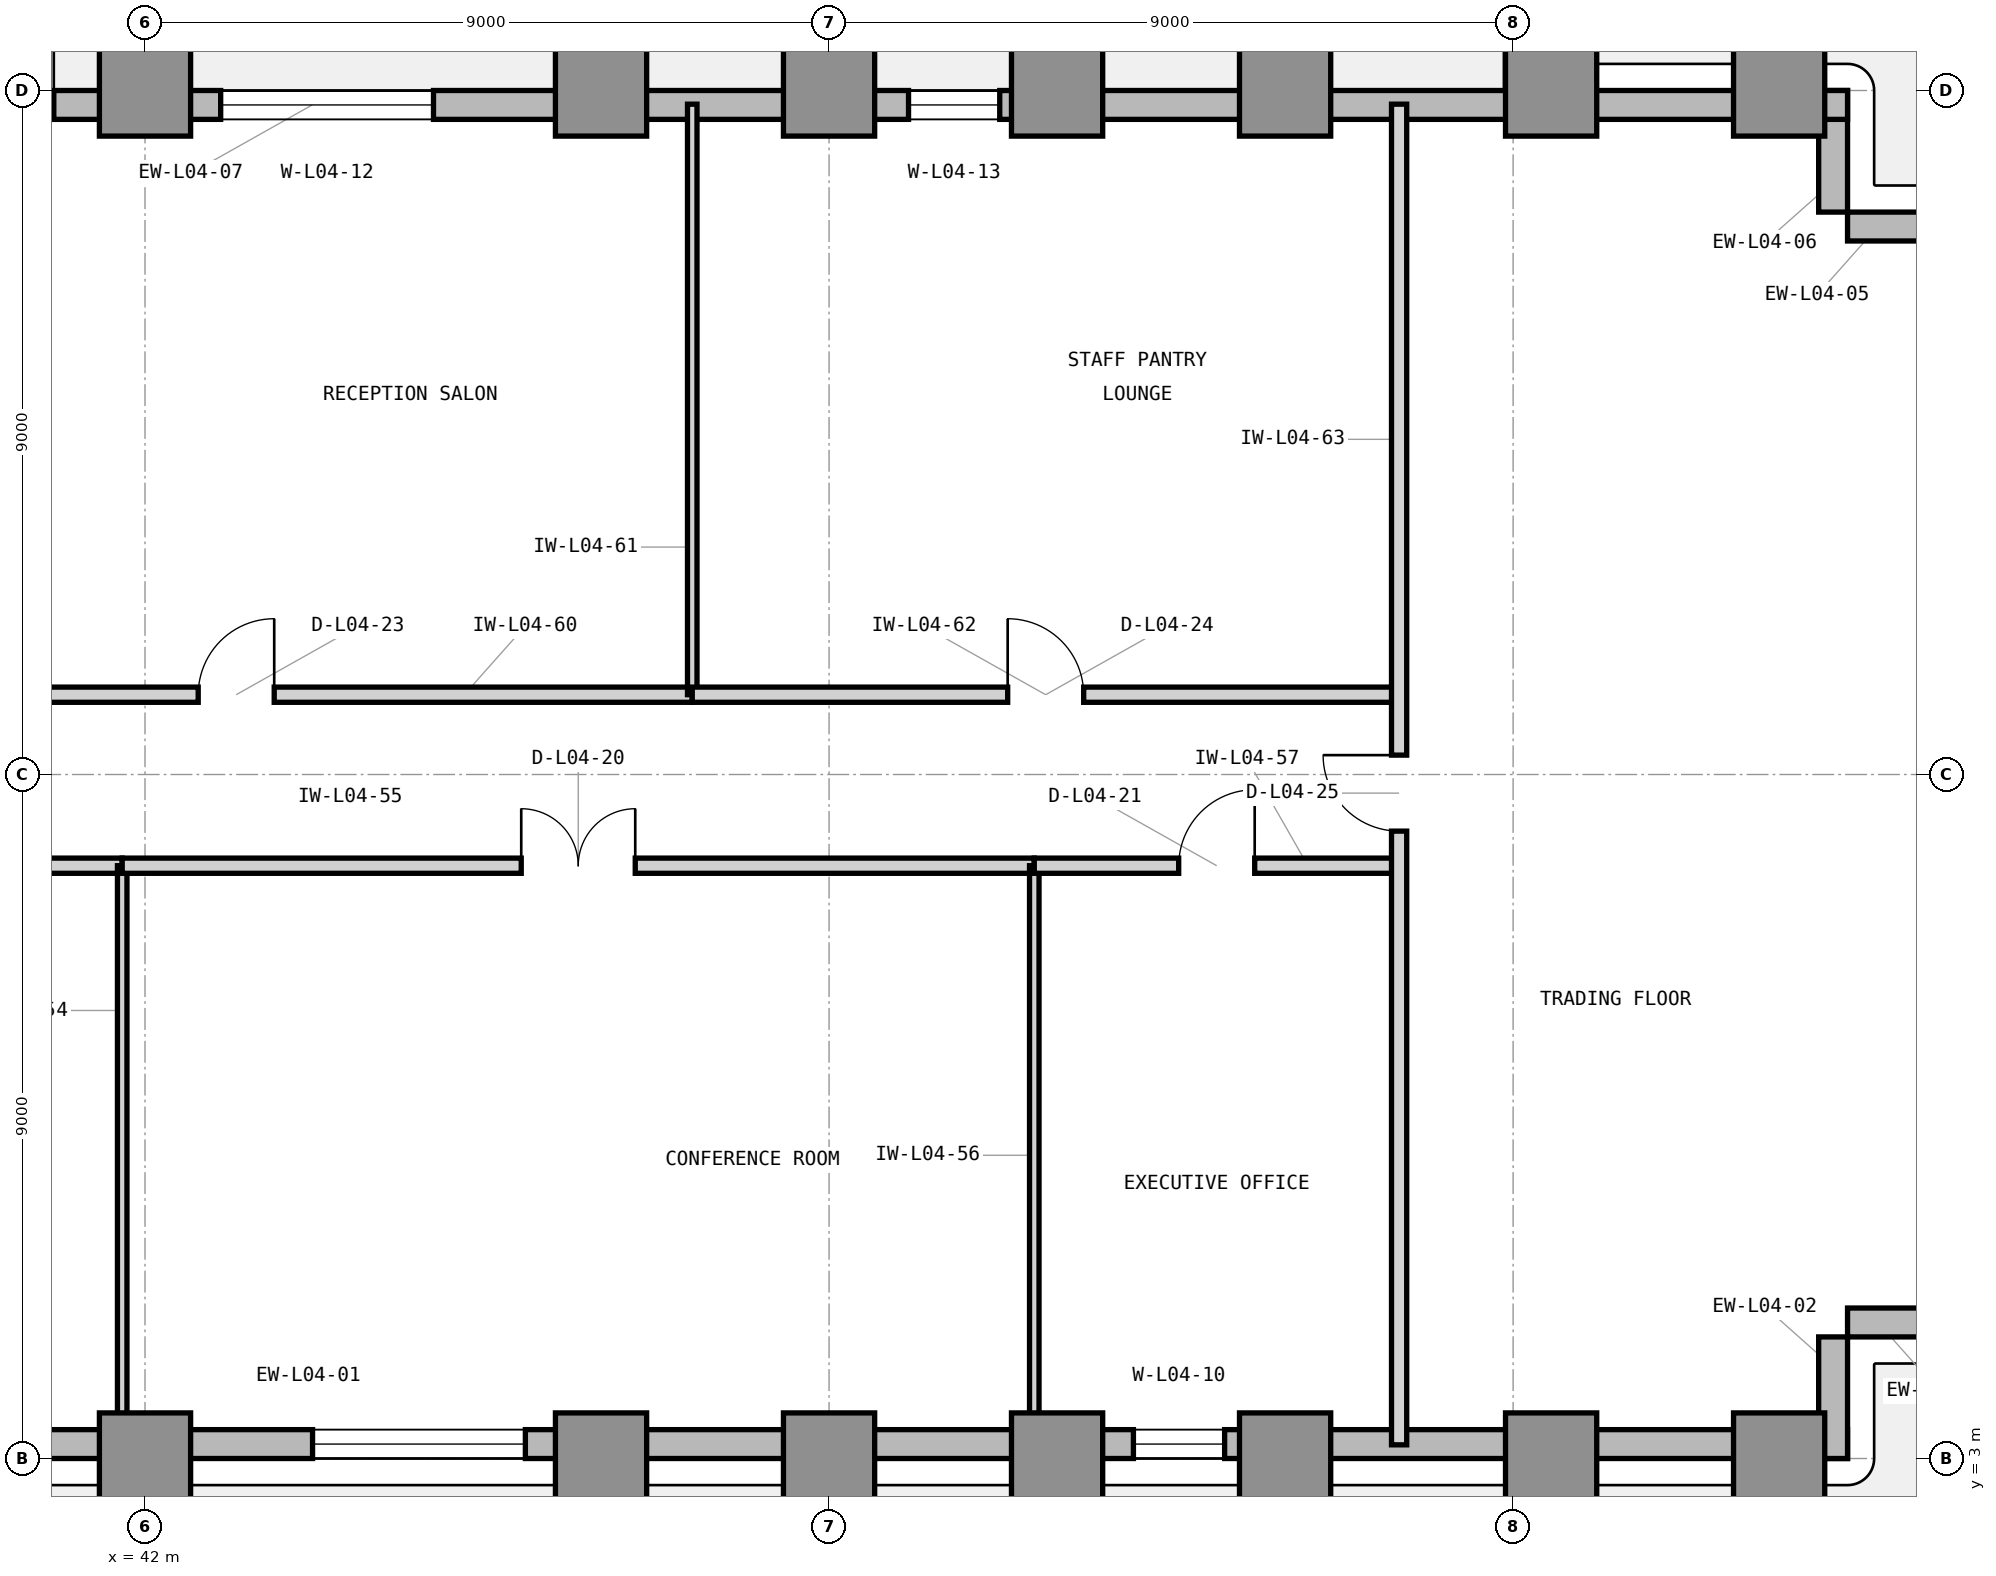
"""IFC4 building model, lengths in metres.
Left out: names, types, materials, properties, quantities, classifications, styles, units other than length and angle.
Written with IfcOpenShell. Run it as: python <this file> out.ifc"""

import sys

from ifc_helpers import new_model, si_unit, direction, frame, frame_2d, origin, origin_2d, place, context, subcontext, project, spatial, rectangle, extrude, element, fill, save


model = new_model("IFC4")
c1 = context("Model", 3, precision=1e-05, world=origin(), true_north=direction((0.0, 1.0)))
c2 = subcontext(c1, "Body", "Model", "MODEL_VIEW")
j1 = project(units=[si_unit("LENGTHUNIT", "METRE"), si_unit("PLANEANGLEUNIT", "RADIAN")], contexts=[c1])
p1 = place(None, origin())
s1 = spatial("IfcSite", under=j1, at=p1, CompositionType="ELEMENT")
p2 = place(p1, origin())
s2 = spatial("IfcBuilding", under=s1, at=p2, CompositionType="ELEMENT")
p3 = place(p2, frame((0.0, 0.0, 21.6)))
s3 = spatial("IfcBuildingStorey", under=s2, at=p3, CompositionType="ELEMENT", Elevation=21.6)
for number, where, z_axis, x_axis in (
    (1, (42.0, 3.0, 0.0), (0.0, 0.0, 1.0), (1.0, 0.0, 0.0)),
    (2, (42.0, 21.0, 0.0), (0.0, 0.0, 1.0), (1.0, 0.0, 0.0)),
    (3, (48.0, 3.0, 0.0), (0.0, 0.0, 1.0), (1.0, 0.0, 0.0)),
    (4, (48.0, 21.0, 0.0), (0.0, 0.0, 1.0), (1.0, 0.0, 0.0)),
    (5, (51.0, 3.0, 0.0), (0.0, 0.0, 1.0), (1.0, 0.0, 0.0)),
    (6, (51.0, 21.0, 0.0), (0.0, 0.0, 1.0), (1.0, 0.0, 0.0)),
    (7, (54.0, 3.0, 0.0), (0.0, 0.0, 1.0), (1.0, 0.0, 0.0)),
    (8, (54.0, 21.0, 0.0), (0.0, 0.0, 1.0), (1.0, 0.0, 0.0)),
    (9, (57.0, 3.0, 0.0), (0.0, 0.0, 1.0), (1.0, 0.0, 0.0)),
    (10, (57.0, 21.0, 0.0), (0.0, 0.0, 1.0), (1.0, 0.0, 0.0)),
    (11, (60.5, 3.0, 0.0), (0.0, 0.0, 1.0), (1.0, 0.0, 0.0)),
    (12, (60.5, 21.0, 0.0), (0.0, 0.0, 1.0), (1.0, 0.0, 0.0)),
    (13, (63.5, 3.0, 0.0), (0.0, 0.0, 1.0), (1.0, 0.0, 0.0)),
    (14, (63.5, 21.0, 0.0), (0.0, 0.0, 1.0), (1.0, 0.0, 0.0)),
):
    element("IfcColumn", number, at=place(p3, frame(where, z_axis=z_axis, x_axis=x_axis)), inside=s3, PredefinedType="COLUMN", context=c2, shape_type="SweptSolid", body=[
        extrude(rectangle(XDim=1.2, YDim=1.2, at=origin_2d()), origin(), (0.0, 0.0, 1.0), 4.2),
    ])
p4 = place(p3, frame((23.9, 3.19, 0.0), z_axis=(0.0, 0.0, 1.0), x_axis=(1.0, 0.0, 0.0)))
e15 = element("IfcWall", 15, at=p4, inside=s3, PredefinedType="STANDARD", context=c2, shape_type="SweptSolid", body=[
    extrude(rectangle(XDim=40.5, YDim=0.38, at=frame_2d((20.25, 0.0))), origin(), (0.0, 0.0, 1.0), 3.98),
])
p5 = place(p4, frame((1.1, 0.0, 0.85)))
e16 = element("IfcOpeningElement", 16, at=p5, cuts=e15, PredefinedType="OPENING", context=c2, shape_type="SweptSolid", body=[
    extrude(rectangle(XDim=1.2, YDim=2.45, at=frame_2d((0.6, 1.225))), frame((0.0, 0.2, 0.0), z_axis=(0.0, -1.0, 0.0), x_axis=(1.0, 0.0, 0.0)), (0.0, 0.0, 1.0), 0.4),
])
p6 = place(p4, frame((10.054, 0.0, 0.85)))
e17 = element("IfcOpeningElement", 17, at=p6, cuts=e15, PredefinedType="OPENING", context=c2, shape_type="SweptSolid", body=[
    extrude(rectangle(XDim=2.8, YDim=2.45, at=frame_2d((1.4, 1.225))), frame((0.0, 0.2, 0.0), z_axis=(0.0, -1.0, 0.0), x_axis=(1.0, 0.0, 0.0)), (0.0, 0.0, 1.0), 0.4),
])
p7 = place(p4, frame((20.304, 0.0, 0.85)))
e18 = element("IfcOpeningElement", 18, at=p7, cuts=e15, PredefinedType="OPENING", context=c2, shape_type="SweptSolid", body=[
    extrude(rectangle(XDim=2.8, YDim=2.45, at=frame_2d((1.4, 1.225))), frame((0.0, 0.2, 0.0), z_axis=(0.0, -1.0, 0.0), x_axis=(1.0, 0.0, 0.0)), (0.0, 0.0, 1.0), 0.4),
])
p8 = place(p4, frame((31.104, 0.0, 0.85)))
e19 = element("IfcOpeningElement", 19, at=p8, cuts=e15, PredefinedType="OPENING", context=c2, shape_type="SweptSolid", body=[
    extrude(rectangle(XDim=1.2, YDim=2.45, at=frame_2d((0.6, 1.225))), frame((0.0, 0.2, 0.0), z_axis=(0.0, -1.0, 0.0), x_axis=(1.0, 0.0, 0.0)), (0.0, 0.0, 1.0), 0.4),
])
for number, where, z_axis, x_axis in (
    (20, (64.21, 3.0, 0.0), (0.0, 0.0, 1.0), (0.0, 1.0, 0.0)),
    (21, (64.4, 4.79, 0.0), (0.0, 0.0, 1.0), (1.0, 0.0, 0.0)),
    (22, (66.0, 19.21, 0.0), (0.0, 0.0, 1.0), (-1.0, 0.0, 0.0)),
    (23, (64.21, 19.4, 0.0), (0.0, 0.0, 1.0), (0.0, 1.0, 0.0)),
):
    element("IfcWall", number, at=place(p3, frame(where, z_axis=z_axis, x_axis=x_axis)), inside=s3, PredefinedType="STANDARD", context=c2, shape_type="SweptSolid", body=[
        extrude(rectangle(XDim=1.6, YDim=0.38, at=frame_2d((0.8, 0.0))), origin(), (0.0, 0.0, 1.0), 3.98),
    ])
p9 = place(p3, frame((64.4, 20.81, 0.0), z_axis=(0.0, 0.0, 1.0), x_axis=(-1.0, 0.0, 0.0)))
e24 = element("IfcWall", 24, at=p9, inside=s3, PredefinedType="STANDARD", context=c2, shape_type="SweptSolid", body=[
    extrude(rectangle(XDim=40.4, YDim=0.38, at=frame_2d((20.2, 0.0))), origin(), (0.0, 0.0, 1.0), 3.98),
])
p10 = place(p9, frame((23.6, 0.0, 0.0)))
e25 = element("IfcOpeningElement", 25, at=p10, cuts=e24, PredefinedType="OPENING", context=c2, shape_type="SweptSolid", body=[
    extrude(rectangle(XDim=1.8, YDim=2.35, at=frame_2d((0.9, 1.175))), frame((0.0, 0.2, 0.0), z_axis=(0.0, -1.0, 0.0), x_axis=(1.0, 0.0, 0.0)), (0.0, 0.0, 1.0), 0.4),
])
p11 = place(p9, frame((38.234, 0.0, 0.85)))
e26 = element("IfcOpeningElement", 26, at=p11, cuts=e24, PredefinedType="OPENING", context=c2, shape_type="SweptSolid", body=[
    extrude(rectangle(XDim=1.2, YDim=2.45, at=frame_2d((0.6, 1.225))), frame((0.0, 0.2, 0.0), z_axis=(0.0, -1.0, 0.0), x_axis=(1.0, 0.0, 0.0)), (0.0, 0.0, 1.0), 0.4),
])
p12 = place(p9, frame((32.354, 0.0, 0.85)))
e27 = element("IfcOpeningElement", 27, at=p12, cuts=e24, PredefinedType="OPENING", context=c2, shape_type="SweptSolid", body=[
    extrude(rectangle(XDim=2.8, YDim=2.45, at=frame_2d((1.4, 1.225))), frame((0.0, 0.2, 0.0), z_axis=(0.0, -1.0, 0.0), x_axis=(1.0, 0.0, 0.0)), (0.0, 0.0, 1.0), 0.4),
])
p13 = place(p9, frame((18.604, 0.0, 0.85)))
e28 = element("IfcOpeningElement", 28, at=p13, cuts=e24, PredefinedType="OPENING", context=c2, shape_type="SweptSolid", body=[
    extrude(rectangle(XDim=2.8, YDim=2.45, at=frame_2d((1.4, 1.225))), frame((0.0, 0.2, 0.0), z_axis=(0.0, -1.0, 0.0), x_axis=(1.0, 0.0, 0.0)), (0.0, 0.0, 1.0), 0.4),
])
p14 = place(p9, frame((11.154, 0.0, 0.85)))
e29 = element("IfcOpeningElement", 29, at=p14, cuts=e24, PredefinedType="OPENING", context=c2, shape_type="SweptSolid", body=[
    extrude(rectangle(XDim=1.2, YDim=2.45, at=frame_2d((0.6, 1.225))), frame((0.0, 0.2, 0.0), z_axis=(0.0, -1.0, 0.0), x_axis=(1.0, 0.0, 0.0)), (0.0, 0.0, 1.0), 0.4),
])
p15 = place(p3, frame((26.7, 10.8, 0.0), z_axis=(0.0, 0.0, 1.0), x_axis=(1.0, 0.0, 0.0)))
e30 = element("IfcWall", 30, at=p15, inside=s3, PredefinedType="PARTITIONING", context=c2, shape_type="SweptSolid", body=[
    extrude(rectangle(XDim=15.0, YDim=0.2, at=frame_2d((7.5, 0.0))), origin(), (0.0, 0.0, 1.0), 3.97),
])
p16 = place(p15, frame((6.5, 0.0, 0.0)))
e31 = element("IfcOpeningElement", 31, at=p16, cuts=e30, PredefinedType="OPENING", context=c2, shape_type="SweptSolid", body=[
    extrude(rectangle(XDim=2.0, YDim=2.5, at=frame_2d((1.0, 1.25))), frame((0.0, 0.11, 0.0), z_axis=(0.0, -1.0, 0.0), x_axis=(1.0, 0.0, 0.0)), (0.0, 0.0, 1.0), 0.22),
])
p17 = place(p3, frame((41.7, 3.18, 0.0), z_axis=(0.0, 0.0, 1.0), x_axis=(0.0, 1.0, 0.0)))
e32 = element("IfcWall", 32, at=p17, inside=s3, PredefinedType="PARTITIONING", context=c2, shape_type="SweptSolid", body=[
    extrude(rectangle(XDim=7.62, YDim=0.125, at=frame_2d((3.81, 0.0))), origin(), (0.0, 0.0, 1.0), 3.97),
])
p18 = place(p3, frame((41.7, 10.8, 0.0), z_axis=(0.0, 0.0, 1.0), x_axis=(1.0, 0.0, 0.0)))
e33 = element("IfcWall", 33, at=p18, inside=s3, PredefinedType="PARTITIONING", context=c2, shape_type="SweptSolid", body=[
    extrude(rectangle(XDim=12.0, YDim=0.2, at=frame_2d((6.0, 0.0))), origin(), (0.0, 0.0, 1.0), 3.97),
])
p19 = place(p18, frame((5.25, 0.0, 0.0)))
e34 = element("IfcOpeningElement", 34, at=p19, cuts=e33, PredefinedType="OPENING", context=c2, shape_type="SweptSolid", body=[
    extrude(rectangle(XDim=1.5, YDim=2.3, at=frame_2d((0.75, 1.15))), frame((0.0, 0.11, 0.0), z_axis=(0.0, -1.0, 0.0), x_axis=(1.0, 0.0, 0.0)), (0.0, 0.0, 1.0), 0.22),
])
p20 = place(p3, frame((53.7, 3.18, 0.0), z_axis=(0.0, 0.0, 1.0), x_axis=(0.0, 1.0, 0.0)))
e35 = element("IfcWall", 35, at=p20, inside=s3, PredefinedType="PARTITIONING", context=c2, shape_type="SweptSolid", body=[
    extrude(rectangle(XDim=7.62, YDim=0.125, at=frame_2d((3.81, 0.0))), origin(), (0.0, 0.0, 1.0), 3.97),
])
p21 = place(p3, frame((53.7, 10.8, 0.0), z_axis=(0.0, 0.0, 1.0), x_axis=(1.0, 0.0, 0.0)))
e36 = element("IfcWall", 36, at=p21, inside=s3, PredefinedType="PARTITIONING", context=c2, shape_type="SweptSolid", body=[
    extrude(rectangle(XDim=4.8, YDim=0.2, at=frame_2d((2.4, 0.0))), origin(), (0.0, 0.0, 1.0), 3.97),
])
p22 = place(p21, frame((1.9, 0.0, 0.0)))
e37 = element("IfcOpeningElement", 37, at=p22, cuts=e36, PredefinedType="OPENING", context=c2, shape_type="SweptSolid", body=[
    extrude(rectangle(XDim=1.0, YDim=2.15, at=frame_2d((0.5, 1.075))), frame((0.0, 0.11, 0.0), z_axis=(0.0, -1.0, 0.0), x_axis=(1.0, 0.0, 0.0)), (0.0, 0.0, 1.0), 0.22),
])
p23 = place(p3, frame((37.2, 13.05, 0.0), z_axis=(0.0, 0.0, 1.0), x_axis=(1.0, 0.0, 0.0)))
e38 = element("IfcWall", 38, at=p23, inside=s3, PredefinedType="PARTITIONING", context=c2, shape_type="SweptSolid", body=[
    extrude(rectangle(XDim=12.0, YDim=0.2, at=frame_2d((6.0, 0.0))), origin(), (0.0, 0.0, 1.0), 3.97),
])
p24 = place(p23, frame((5.5, 0.0, 0.0)))
e39 = element("IfcOpeningElement", 39, at=p24, cuts=e38, PredefinedType="OPENING", context=c2, shape_type="SweptSolid", body=[
    extrude(rectangle(XDim=1.0, YDim=2.15, at=frame_2d((0.5, 1.075))), frame((0.0, 0.11, 0.0), z_axis=(0.0, -1.0, 0.0), x_axis=(1.0, 0.0, 0.0)), (0.0, 0.0, 1.0), 0.22),
])
p25 = place(p3, frame((49.2, 13.05, 0.0), z_axis=(0.0, 0.0, 1.0), x_axis=(0.0, 1.0, 0.0)))
e40 = element("IfcWall", 40, at=p25, inside=s3, PredefinedType="PARTITIONING", context=c2, shape_type="SweptSolid", body=[
    extrude(rectangle(XDim=7.77, YDim=0.125, at=frame_2d((3.885, 0.0))), origin(), (0.0, 0.0, 1.0), 3.97),
])
p26 = place(p3, frame((49.2, 13.05, 0.0), z_axis=(0.0, 0.0, 1.0), x_axis=(1.0, 0.0, 0.0)))
e41 = element("IfcWall", 41, at=p26, inside=s3, PredefinedType="PARTITIONING", context=c2, shape_type="SweptSolid", body=[
    extrude(rectangle(XDim=9.3, YDim=0.2, at=frame_2d((4.65, 0.0))), origin(), (0.0, 0.0, 1.0), 3.97),
])
p27 = place(p26, frame((4.15, 0.0, 0.0)))
e42 = element("IfcOpeningElement", 42, at=p27, cuts=e41, PredefinedType="OPENING", context=c2, shape_type="SweptSolid", body=[
    extrude(rectangle(XDim=1.0, YDim=2.15, at=frame_2d((0.5, 1.075))), frame((0.0, 0.11, 0.0), z_axis=(0.0, -1.0, 0.0), x_axis=(1.0, 0.0, 0.0)), (0.0, 0.0, 1.0), 0.22),
])
p28 = place(p3, frame((58.5, 3.18, 0.0), z_axis=(0.0, 0.0, 1.0), x_axis=(0.0, 1.0, 0.0)))
e43 = element("IfcWall", 43, at=p28, inside=s3, PredefinedType="PARTITIONING", context=c2, shape_type="SweptSolid", body=[
    extrude(rectangle(XDim=17.64, YDim=0.2, at=frame_2d((8.82, 0.0))), origin(), (0.0, 0.0, 1.0), 3.97),
])
p29 = place(p28, frame((8.075, 0.0, 0.0)))
e44 = element("IfcOpeningElement", 44, at=p29, cuts=e43, PredefinedType="OPENING", context=c2, shape_type="SweptSolid", body=[
    extrude(rectangle(XDim=1.0, YDim=2.15, at=frame_2d((0.5, 1.075))), frame((0.0, 0.11, 0.0), z_axis=(0.0, -1.0, 0.0), x_axis=(1.0, 0.0, 0.0)), (0.0, 0.0, 1.0), 0.22),
])
p30 = place(p10, frame((1.8, 0.0, 0.0), z_axis=(0.0, 0.0, 1.0), x_axis=(-1.0, 0.0, 0.0)))
e45 = element("IfcDoor", 45, at=p30, inside=s3, OperationType="DOUBLE_DOOR_SINGLE_SWING", PredefinedType="DOOR", context=c2, shape_type="SweptSolid", body=[
    extrude(rectangle(XDim=1.8, YDim=2.35, at=frame_2d((0.9, 1.175))), frame((0.0, 0.025, 0.0), z_axis=(0.0, -1.0, 0.0), x_axis=(1.0, 0.0, 0.0)), (0.0, 0.0, 1.0), 0.05),
])
fill(e25, e45)
p31 = place(p19, origin())
e46 = element("IfcDoor", 46, at=p31, inside=s3, OperationType="DOUBLE_DOOR_SINGLE_SWING", PredefinedType="DOOR", context=c2, shape_type="SweptSolid", body=[
    extrude(rectangle(XDim=1.5, YDim=2.3, at=frame_2d((0.75, 1.15))), frame((0.0, 0.025, 0.0), z_axis=(0.0, -1.0, 0.0), x_axis=(1.0, 0.0, 0.0)), (0.0, 0.0, 1.0), 0.05),
])
fill(e34, e46)
p32 = place(p22, origin())
e47 = element("IfcDoor", 47, at=p32, inside=s3, OperationType="SINGLE_SWING_RIGHT", PredefinedType="DOOR", context=c2, shape_type="SweptSolid", body=[
    extrude(rectangle(XDim=1.0, YDim=2.15, at=frame_2d((0.5, 1.075))), frame((0.0, 0.025, 0.0), z_axis=(0.0, -1.0, 0.0), x_axis=(1.0, 0.0, 0.0)), (0.0, 0.0, 1.0), 0.05),
])
fill(e37, e47)
p33 = place(p24, origin())
e48 = element("IfcDoor", 48, at=p33, inside=s3, OperationType="SINGLE_SWING_RIGHT", PredefinedType="DOOR", context=c2, shape_type="SweptSolid", body=[
    extrude(rectangle(XDim=1.0, YDim=2.15, at=frame_2d((0.5, 1.075))), frame((0.0, 0.025, 0.0), z_axis=(0.0, -1.0, 0.0), x_axis=(1.0, 0.0, 0.0)), (0.0, 0.0, 1.0), 0.05),
])
fill(e39, e48)
p34 = place(p27, origin())
e49 = element("IfcDoor", 49, at=p34, inside=s3, OperationType="SINGLE_SWING_LEFT", PredefinedType="DOOR", context=c2, shape_type="SweptSolid", body=[
    extrude(rectangle(XDim=1.0, YDim=2.15, at=frame_2d((0.5, 1.075))), frame((0.0, 0.025, 0.0), z_axis=(0.0, -1.0, 0.0), x_axis=(1.0, 0.0, 0.0)), (0.0, 0.0, 1.0), 0.05),
])
fill(e42, e49)
p35 = place(p29, origin())
e50 = element("IfcDoor", 50, at=p35, inside=s3, OperationType="SINGLE_SWING_RIGHT", PredefinedType="DOOR", context=c2, shape_type="SweptSolid", body=[
    extrude(rectangle(XDim=1.0, YDim=2.15, at=frame_2d((0.5, 1.075))), frame((0.0, 0.025, 0.0), z_axis=(0.0, -1.0, 0.0), x_axis=(1.0, 0.0, 0.0)), (0.0, 0.0, 1.0), 0.05),
])
fill(e44, e50)
p36 = place(p7, origin())
e51 = element("IfcWindow", 51, at=p36, inside=s3, PartitioningType="SINGLE_PANEL", PredefinedType="WINDOW", context=c2, shape_type="SweptSolid", body=[
    extrude(rectangle(XDim=2.8, YDim=2.45, at=frame_2d((1.4, 1.225))), frame((0.0, 0.11, 0.0), z_axis=(0.0, -1.0, 0.0), x_axis=(1.0, 0.0, 0.0)), (0.0, 0.0, 1.0), 0.06),
])
fill(e18, e51)
p37 = place(p8, origin())
e52 = element("IfcWindow", 52, at=p37, inside=s3, PartitioningType="SINGLE_PANEL", PredefinedType="WINDOW", context=c2, shape_type="SweptSolid", body=[
    extrude(rectangle(XDim=1.2, YDim=2.45, at=frame_2d((0.6, 1.225))), frame((0.0, 0.11, 0.0), z_axis=(0.0, -1.0, 0.0), x_axis=(1.0, 0.0, 0.0)), (0.0, 0.0, 1.0), 0.06),
])
fill(e19, e52)
p38 = place(p13, origin())
e53 = element("IfcWindow", 53, at=p38, inside=s3, PartitioningType="SINGLE_PANEL", PredefinedType="WINDOW", context=c2, shape_type="SweptSolid", body=[
    extrude(rectangle(XDim=2.8, YDim=2.45, at=frame_2d((1.4, 1.225))), frame((0.0, 0.11, 0.0), z_axis=(0.0, -1.0, 0.0), x_axis=(1.0, 0.0, 0.0)), (0.0, 0.0, 1.0), 0.06),
])
fill(e28, e53)
p39 = place(p14, origin())
e54 = element("IfcWindow", 54, at=p39, inside=s3, PartitioningType="SINGLE_PANEL", PredefinedType="WINDOW", context=c2, shape_type="SweptSolid", body=[
    extrude(rectangle(XDim=1.2, YDim=2.45, at=frame_2d((0.6, 1.225))), frame((0.0, 0.11, 0.0), z_axis=(0.0, -1.0, 0.0), x_axis=(1.0, 0.0, 0.0)), (0.0, 0.0, 1.0), 0.06),
])
fill(e29, e54)
save(model, sys.argv[1])
